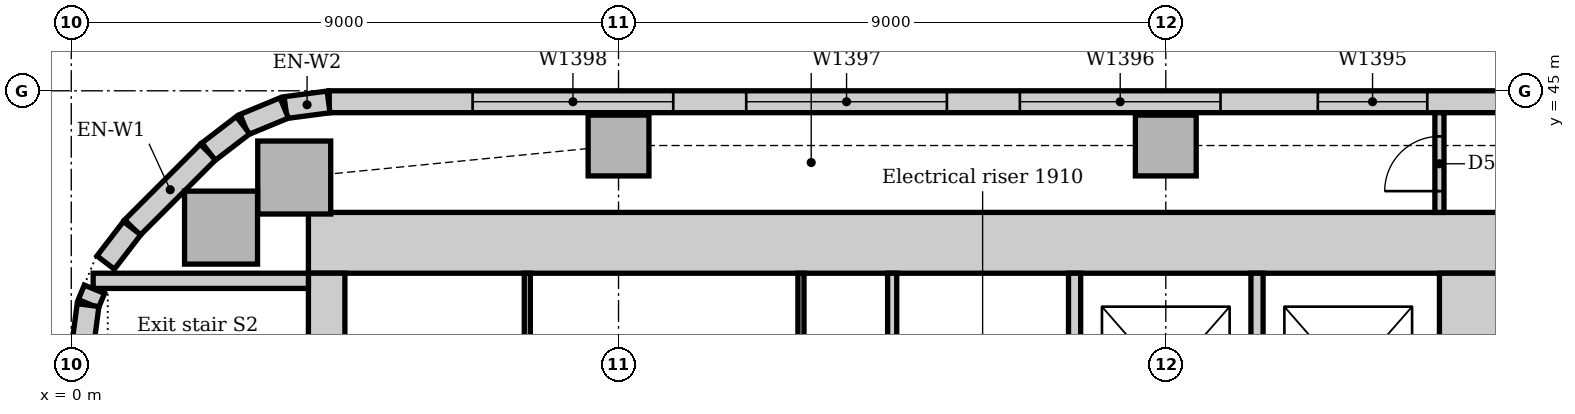
"""IFC4 building model, lengths in metres.
Left out: names, types, materials, properties, quantities, classifications, styles, units other than length and angle.
Written with IfcOpenShell. Run it as: python <this file> out.ifc"""

import sys

from ifc_helpers import new_model, si_unit, direction, frame, frame_2d, origin, origin_2d, place, context, subcontext, project, spatial, rectangle, extrude, element, fill, save


model = new_model("IFC4")
c1 = context("Model", 3, precision=1e-05, world=origin(), true_north=direction((0.0, 1.0)))
c2 = subcontext(c1, "Body", "Model", "MODEL_VIEW")
j1 = project(units=[si_unit("LENGTHUNIT", "METRE"), si_unit("PLANEANGLEUNIT", "RADIAN")], contexts=[c1])
p1 = place(None, origin())
s1 = spatial("IfcSite", under=j1, at=p1, CompositionType="ELEMENT")
p2 = place(p1, origin())
s2 = spatial("IfcBuilding", under=s1, at=p2, CompositionType="ELEMENT")
p3 = place(p2, frame((0.0, 0.0, 83.0)))
s3 = spatial("IfcBuildingStorey", under=s2, at=p3, CompositionType="ELEMENT", Elevation=83.0)
p4 = place(p3, frame((23.5, 42.5, 0.0), z_axis=(0.0, 0.0, 1.0), x_axis=(-1.0, 0.0, 0.0)))
e1 = element("IfcWall", 1, at=p4, inside=s3, PredefinedType="SOLIDWALL", context=c2, shape_type="SweptSolid", body=[
    extrude(rectangle(XDim=19.6, YDim=1.0, at=frame_2d((9.8, 0.0))), origin(), (0.0, 0.0, 1.0), 4.0),
])
p5 = place(p3, frame((23.0, 31.5, 0.0), z_axis=(0.0, 0.0, 1.0), x_axis=(0.0, 1.0, 0.0)))
e2 = element("IfcWall", 2, at=p5, inside=s3, PredefinedType="SOLIDWALL", context=c2, shape_type="SweptSolid", body=[
    extrude(rectangle(XDim=10.5, YDim=1.0, at=frame_2d((5.25, 0.0))), origin(), (0.0, 0.0, 1.0), 4.0),
])
p6 = place(p5, frame((3.15, 0.0, 0.0)))
e3 = element("IfcOpeningElement", 3, at=p6, cuts=e2, PredefinedType="OPENING", context=c2, shape_type="SweptSolid", body=[
    extrude(rectangle(XDim=1.0, YDim=2.1, at=frame_2d((0.5, 1.05))), frame((0.0, 0.51, 0.0), z_axis=(0.0, -1.0, 0.0), x_axis=(1.0, 0.0, 0.0)), (0.0, 0.0, 1.0), 1.02),
])
p7 = place(p5, frame((5.2, 0.0, 0.0)))
e4 = element("IfcOpeningElement", 4, at=p7, cuts=e2, PredefinedType="OPENING", context=c2, shape_type="SweptSolid", body=[
    extrude(rectangle(XDim=1.0, YDim=2.1, at=frame_2d((0.5, 1.05))), frame((0.0, 0.51, 0.0), z_axis=(0.0, -1.0, 0.0), x_axis=(1.0, 0.0, 0.0)), (0.0, 0.0, 1.0), 1.02),
])
p8 = place(p3, frame((4.2, 42.0, 0.0), z_axis=(0.0, 0.0, 1.0), x_axis=(0.0, -1.0, 0.0)))
e5 = element("IfcWall", 5, at=p8, inside=s3, PredefinedType="SOLIDWALL", context=c2, shape_type="SweptSolid", body=[
    extrude(rectangle(XDim=10.5, YDim=0.6, at=frame_2d((5.25, 0.0))), origin(), (0.0, 0.0, 1.0), 4.0),
])
p9 = place(p8, frame((5.3, 0.0, 0.0)))
e6 = element("IfcOpeningElement", 6, at=p9, cuts=e5, PredefinedType="OPENING", context=c2, shape_type="SweptSolid", body=[
    extrude(rectangle(XDim=1.0, YDim=2.1, at=frame_2d((0.5, 1.05))), frame((0.0, 0.31, 0.0), z_axis=(0.0, -1.0, 0.0), x_axis=(1.0, 0.0, 0.0)), (0.0, 0.0, 1.0), 0.62),
])
p10 = place(p3, frame((3.9, 41.875, 0.0), z_axis=(0.0, 0.0, 1.0), x_axis=(-1.0, 0.0, 0.0)))
e7 = element("IfcWall", 7, at=p10, inside=s3, PredefinedType="SOLIDWALL", context=c2, shape_type="SweptSolid", body=[
    extrude(rectangle(XDim=3.54, YDim=0.25, at=frame_2d((1.77, 0.0))), origin(), (0.0, 0.0, 1.0), 4.0),
])
for number, where, z_axis, x_axis in (
    (8, (3.667, 43.574, 0.0), (0.0, 0.0, 1.0), (1.0, 0.0, 0.0)),
    (9, (2.463, 42.75, 0.0), (0.0, 0.0, 1.0), (1.0, 0.0, 0.0)),
):
    element("IfcColumn", number, at=place(p3, frame(where, z_axis=z_axis, x_axis=x_axis)), inside=s3, PredefinedType="COLUMN", context=c2, shape_type="SweptSolid", body=[
        extrude(rectangle(XDim=1.2, YDim=1.2, at=origin_2d()), origin(), (0.0, 0.0, 1.0), 3.85),
    ])
for number, where, z_axis, x_axis in (
    (10, (9.0, 44.1, 0.0), (0.0, 0.0, 1.0), (1.0, 0.0, 0.0)),
    (11, (18.0, 44.1, 0.0), (0.0, 0.0, 1.0), (1.0, 0.0, 0.0)),
):
    element("IfcColumn", number, at=place(p3, frame(where, z_axis=z_axis, x_axis=x_axis)), inside=s3, PredefinedType="COLUMN", context=c2, shape_type="SweptSolid", body=[
        extrude(rectangle(XDim=1.0, YDim=1.0, at=origin_2d()), origin(), (0.0, 0.0, 1.0), 3.85),
    ])
p11 = place(p3, frame((48.257, 44.82, 0.0), z_axis=(0.0, 0.0, 1.0), x_axis=(-1.0, 0.0, 0.0)))
e12 = element("IfcWall", 12, at=p11, inside=s3, PredefinedType="STANDARD", context=c2, shape_type="SweptSolid", body=[
    extrude(rectangle(XDim=44.015, YDim=0.36, at=frame_2d((22.007, 0.0))), origin(), (0.0, 0.0, 1.0), 3.85),
])
p12 = place(p11, frame((2.057, 0.0, 0.9)))
e13 = element("IfcOpeningElement", 13, at=p12, cuts=e12, PredefinedType="OPENING", context=c2, shape_type="SweptSolid", body=[
    extrude(rectangle(XDim=3.3, YDim=1.6, at=frame_2d((1.65, 0.8))), frame((0.0, 0.19, 0.0), z_axis=(0.0, -1.0, 0.0), x_axis=(1.0, 0.0, 0.0)), (0.0, 0.0, 1.0), 0.38),
])
p13 = place(p11, frame((6.857, 0.0, 0.9)))
e14 = element("IfcOpeningElement", 14, at=p13, cuts=e12, PredefinedType="OPENING", context=c2, shape_type="SweptSolid", body=[
    extrude(rectangle(XDim=3.3, YDim=1.6, at=frame_2d((1.65, 0.8))), frame((0.0, 0.19, 0.0), z_axis=(0.0, -1.0, 0.0), x_axis=(1.0, 0.0, 0.0)), (0.0, 0.0, 1.0), 0.38),
])
p14 = place(p11, frame((11.357, 0.0, 0.9)))
e15 = element("IfcOpeningElement", 15, at=p14, cuts=e12, PredefinedType="OPENING", context=c2, shape_type="SweptSolid", body=[
    extrude(rectangle(XDim=3.3, YDim=1.6, at=frame_2d((1.65, 0.8))), frame((0.0, 0.19, 0.0), z_axis=(0.0, -1.0, 0.0), x_axis=(1.0, 0.0, 0.0)), (0.0, 0.0, 1.0), 0.38),
])
p15 = place(p11, frame((15.857, 0.0, 0.9)))
e16 = element("IfcOpeningElement", 16, at=p15, cuts=e12, PredefinedType="OPENING", context=c2, shape_type="SweptSolid", body=[
    extrude(rectangle(XDim=3.3, YDim=1.6, at=frame_2d((1.65, 0.8))), frame((0.0, 0.19, 0.0), z_axis=(0.0, -1.0, 0.0), x_axis=(1.0, 0.0, 0.0)), (0.0, 0.0, 1.0), 0.38),
])
p16 = place(p11, frame((20.357, 0.0, 0.9)))
e17 = element("IfcOpeningElement", 17, at=p16, cuts=e12, PredefinedType="OPENING", context=c2, shape_type="SweptSolid", body=[
    extrude(rectangle(XDim=3.3, YDim=1.6, at=frame_2d((1.65, 0.8))), frame((0.0, 0.19, 0.0), z_axis=(0.0, -1.0, 0.0), x_axis=(1.0, 0.0, 0.0)), (0.0, 0.0, 1.0), 0.38),
])
p17 = place(p11, frame((25.957, 0.0, 0.9)))
e18 = element("IfcOpeningElement", 18, at=p17, cuts=e12, PredefinedType="OPENING", context=c2, shape_type="SweptSolid", body=[
    extrude(rectangle(XDim=1.8, YDim=1.6, at=frame_2d((0.9, 0.8))), frame((0.0, 0.19, 0.0), z_axis=(0.0, -1.0, 0.0), x_axis=(1.0, 0.0, 0.0)), (0.0, 0.0, 1.0), 0.38),
])
p18 = place(p11, frame((29.357, 0.0, 0.9)))
e19 = element("IfcOpeningElement", 19, at=p18, cuts=e12, PredefinedType="OPENING", context=c2, shape_type="SweptSolid", body=[
    extrude(rectangle(XDim=3.3, YDim=1.6, at=frame_2d((1.65, 0.8))), frame((0.0, 0.19, 0.0), z_axis=(0.0, -1.0, 0.0), x_axis=(1.0, 0.0, 0.0)), (0.0, 0.0, 1.0), 0.38),
])
p19 = place(p11, frame((33.857, 0.0, 0.9)))
e20 = element("IfcOpeningElement", 20, at=p19, cuts=e12, PredefinedType="OPENING", context=c2, shape_type="SweptSolid", body=[
    extrude(rectangle(XDim=3.3, YDim=1.6, at=frame_2d((1.65, 0.8))), frame((0.0, 0.19, 0.0), z_axis=(0.0, -1.0, 0.0), x_axis=(1.0, 0.0, 0.0)), (0.0, 0.0, 1.0), 0.38),
])
p20 = place(p11, frame((38.357, 0.0, 0.9)))
e21 = element("IfcOpeningElement", 21, at=p20, cuts=e12, PredefinedType="OPENING", context=c2, shape_type="SweptSolid", body=[
    extrude(rectangle(XDim=3.3, YDim=1.6, at=frame_2d((1.65, 0.8))), frame((0.0, 0.19, 0.0), z_axis=(0.0, -1.0, 0.0), x_axis=(1.0, 0.0, 0.0)), (0.0, 0.0, 1.0), 0.38),
])
p21 = place(p3, frame((2.249, 43.994, 0.0), z_axis=(0.0, 0.0, 1.0), x_axis=(-0.707106781187, -0.707106781187, 0.0)))
e22 = element("IfcWall", 22, at=p21, inside=s3, PredefinedType="STANDARD", context=c2, shape_type="SweptSolid", body=[
    extrude(rectangle(XDim=1.757, YDim=0.36, at=frame_2d((0.879, 0.0))), origin(), (0.0, 0.0, 1.0), 3.85),
])
for number, where, z_axis, x_axis in (
    (23, (4.231, 44.817, 0.0), (0.0, 0.0, 1.0), (-0.991, -0.131, 0.0)),
    (24, (3.503, 44.718, 0.0), (0.0, 0.0, 1.0), (-0.924, -0.383, 0.0)),
):
    element("IfcWall", number, at=place(p3, frame(where, z_axis=z_axis, x_axis=x_axis)), inside=s3, PredefinedType="STANDARD", context=c2, shape_type="SweptSolid", body=[
        extrude(rectangle(XDim=0.713, YDim=0.36, at=frame_2d((0.356, 0.0))), origin(), (0.0, 0.0, 1.0), 3.85),
    ])
for number, where, z_axis, x_axis in (
    (25, (2.825, 44.434, 0.0), (0.0, 0.0, 1.0), (-0.793, -0.609, 0.0)),
    (26, (1.0, 42.741, 0.0), (0.0, 0.0, 1.0), (-0.609, -0.793, 0.0)),
):
    element("IfcWall", number, at=place(p3, frame(where, z_axis=z_axis, x_axis=x_axis)), inside=s3, PredefinedType="STANDARD", context=c2, shape_type="SweptSolid", body=[
        extrude(rectangle(XDim=0.713, YDim=0.36, at=frame_2d((0.357, 0.0))), origin(), (0.0, 0.0, 1.0), 3.85),
    ])
p22 = place(p3, frame((0.381, 41.736, 0.0), z_axis=(0.0, 0.0, 1.0), x_axis=(-0.382773360986, -0.923842277729, 0.0)))
e27 = element("IfcWall", 27, at=p22, inside=s3, PredefinedType="STANDARD", context=c2, shape_type="SweptSolid", body=[
    extrude(rectangle(XDim=0.258, YDim=0.36, at=frame_2d((0.129, 0.0))), origin(), (0.0, 0.0, 1.0), 3.85),
])
p23 = place(p3, frame((0.276, 41.476, 0.0), z_axis=(0.0, 0.0, 1.0), x_axis=(-0.13055608231, -0.99144092581, 0.0)))
e28 = element("IfcWall", 28, at=p23, inside=s3, PredefinedType="STANDARD", context=c2, shape_type="SweptSolid", body=[
    extrude(rectangle(XDim=0.713, YDim=0.36, at=frame_2d((0.356, 0.0))), origin(), (0.0, 0.0, 1.0), 3.85),
])
for number, where, z_axis, x_axis in (
    (29, (16.5, 38.6, 0.0), (0.0, 0.0, 1.0), (0.0, 1.0, 0.0)),
    (30, (19.5, 38.6, 0.0), (0.0, 0.0, 1.0), (0.0, 1.0, 0.0)),
):
    element("IfcWall", number, at=place(p3, frame(where, z_axis=z_axis, x_axis=x_axis)), inside=s3, PredefinedType="PARTITIONING", context=c2, shape_type="SweptSolid", body=[
        extrude(rectangle(XDim=3.4, YDim=0.2, at=frame_2d((1.7, 0.0))), origin(), (0.0, 0.0, 1.0), 3.85),
    ])
p24 = place(p3, frame((22.5, 43.0, 0.0), z_axis=(0.0, 0.0, 1.0), x_axis=(0.0, 1.0, 0.0)))
e31 = element("IfcWall", 31, at=p24, inside=s3, PredefinedType="PARTITIONING", context=c2, shape_type="SweptSolid", body=[
    extrude(rectangle(XDim=1.64, YDim=0.15, at=frame_2d((0.82, 0.0))), origin(), (0.0, 0.0, 1.0), 3.85),
])
p25 = place(p24, frame((0.35, 0.0, 0.0)))
e32 = element("IfcOpeningElement", 32, at=p25, cuts=e31, PredefinedType="OPENING", context=c2, shape_type="SweptSolid", body=[
    extrude(rectangle(XDim=0.9, YDim=2.1, at=frame_2d((0.45, 1.05))), frame((0.0, 0.085, 0.0), z_axis=(0.0, -1.0, 0.0), x_axis=(1.0, 0.0, 0.0)), (0.0, 0.0, 1.0), 0.17),
])
p26 = place(p3, frame((13.5, 38.575, 0.0), z_axis=(0.0, 0.0, 1.0), x_axis=(0.0, 1.0, 0.0)))
e33 = element("IfcWall", 33, at=p26, inside=s3, PredefinedType="PARTITIONING", context=c2, shape_type="SweptSolid", body=[
    extrude(rectangle(XDim=3.425, YDim=0.15, at=frame_2d((1.712, 0.0))), origin(), (0.0, 0.0, 1.0), 3.85),
])
for number, where, z_axis, x_axis in (
    (34, (7.5, 38.575, 0.0), (0.0, 0.0, 1.0), (0.0, 1.0, 0.0)),
    (35, (12.0, 38.575, 0.0), (0.0, 0.0, 1.0), (0.0, 1.0, 0.0)),
):
    element("IfcWall", number, at=place(p3, frame(where, z_axis=z_axis, x_axis=x_axis)), inside=s3, PredefinedType="PARTITIONING", context=c2, shape_type="SweptSolid", body=[
        extrude(rectangle(XDim=3.425, YDim=0.1, at=frame_2d((1.712, 0.0))), origin(), (0.0, 0.0, 1.0), 3.85),
    ])
p27 = place(p17, origin())
e36 = element("IfcWindow", 36, at=p27, inside=s3, PartitioningType="SINGLE_PANEL", PredefinedType="WINDOW", context=c2, shape_type="SweptSolid", body=[
    extrude(rectangle(XDim=1.8, YDim=1.6, at=frame_2d((0.9, 0.8))), frame((0.0, 0.13, 0.0), z_axis=(0.0, -1.0, 0.0), x_axis=(1.0, 0.0, 0.0)), (0.0, 0.0, 1.0), 0.06),
])
fill(e18, e36)
p28 = place(p18, origin())
e37 = element("IfcWindow", 37, at=p28, inside=s3, PartitioningType="SINGLE_PANEL", PredefinedType="WINDOW", context=c2, shape_type="SweptSolid", body=[
    extrude(rectangle(XDim=3.3, YDim=1.6, at=frame_2d((1.65, 0.8))), frame((0.0, 0.13, 0.0), z_axis=(0.0, -1.0, 0.0), x_axis=(1.0, 0.0, 0.0)), (0.0, 0.0, 1.0), 0.06),
])
fill(e19, e37)
p29 = place(p19, origin())
e38 = element("IfcWindow", 38, at=p29, inside=s3, PartitioningType="SINGLE_PANEL", PredefinedType="WINDOW", context=c2, shape_type="SweptSolid", body=[
    extrude(rectangle(XDim=3.3, YDim=1.6, at=frame_2d((1.65, 0.8))), frame((0.0, 0.13, 0.0), z_axis=(0.0, -1.0, 0.0), x_axis=(1.0, 0.0, 0.0)), (0.0, 0.0, 1.0), 0.06),
])
fill(e20, e38)
p30 = place(p20, origin())
e39 = element("IfcWindow", 39, at=p30, inside=s3, PartitioningType="SINGLE_PANEL", PredefinedType="WINDOW", context=c2, shape_type="SweptSolid", body=[
    extrude(rectangle(XDim=3.3, YDim=1.6, at=frame_2d((1.65, 0.8))), frame((0.0, 0.13, 0.0), z_axis=(0.0, -1.0, 0.0), x_axis=(1.0, 0.0, 0.0)), (0.0, 0.0, 1.0), 0.06),
])
fill(e21, e39)
p31 = place(p25, origin())
e40 = element("IfcDoor", 40, at=p31, inside=s3, OperationType="SINGLE_SWING_LEFT", PredefinedType="DOOR", context=c2, shape_type="SweptSolid", body=[
    extrude(rectangle(XDim=0.9, YDim=2.1, at=frame_2d((0.45, 1.05))), frame((0.0, 0.025, 0.0), z_axis=(0.0, -1.0, 0.0), x_axis=(1.0, 0.0, 0.0)), (0.0, 0.0, 1.0), 0.05),
])
fill(e32, e40)
save(model, sys.argv[1])
